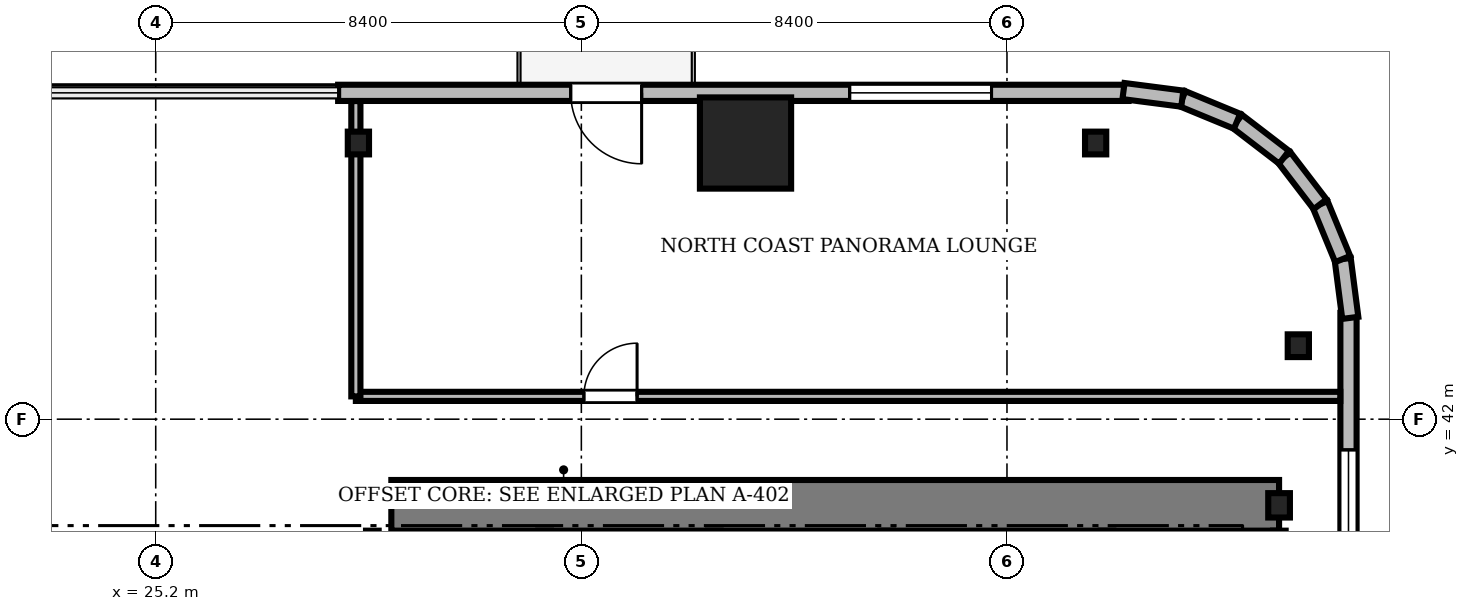
"""IFC4 building model, lengths in metres.
Left out: names, types, materials, properties, quantities, classifications, styles, units other than length and angle.
Written with IfcOpenShell. Run it as: python <this file> out.ifc"""

import sys

from ifc_helpers import new_model, si_unit, direction, frame, frame_2d, origin, origin_2d, place, context, subcontext, project, spatial, rectangle, i_section, extrude, source, transform, mapped, element, fill, save


model = new_model("IFC4")
c1 = context("Model", 3, precision=1e-05, world=origin(), true_north=direction((0.0, 1.0)))
c2 = subcontext(c1, "Body", "Model", "MODEL_VIEW")
j1 = project(units=[si_unit("LENGTHUNIT", "METRE"), si_unit("PLANEANGLEUNIT", "RADIAN")], contexts=[c1])
p1 = place(None, origin())
s1 = spatial("IfcSite", under=j1, at=p1, CompositionType="ELEMENT")
p2 = place(p1, origin())
s2 = spatial("IfcBuilding", under=s1, at=p2, CompositionType="ELEMENT")
p3 = place(p2, frame((0.0, 0.0, 49.5)))
s3 = spatial("IfcBuildingStorey", under=s2, at=p3, CompositionType="ELEMENT", Elevation=49.5)
m1 = source(origin(), c2, "Body", "SweptSolid", [
    extrude(rectangle(XDim=17.52, YDim=1.0, at=frame_2d((8.76, 0.0))), origin(), (0.0, 0.0, 1.0), 3.41),
])
p4 = place(p3, frame((29.85, 40.3, 0.0), z_axis=(0.0, 0.0, 1.0), x_axis=(1.0, 0.0, 0.0)))
e1 = element("IfcWall", 1, at=p4, inside=s3, PredefinedType="SHEAR", context=c2, shape_type="MappedRepresentation", body=[
    mapped(m1, transform((0.0, 0.0, 0.0), scale=1.0)),
])
m2 = source(origin(), c2, "Body", "SweptSolid", [
    extrude(i_section(OverallWidth=0.428, OverallDepth=0.481, WebThickness=0.04, FlangeThickness=0.063, FilletRadius=0.015, at=origin_2d()), origin(), (0.0, 0.0, 1.0), 3.41),
])
p5 = place(p3, frame((47.37, 40.3, 0.0), z_axis=(0.0, 0.0, 1.0), x_axis=(1.0, 0.0, 0.0)))
e2 = element("IfcColumn", 2, at=p5, inside=s3, PredefinedType="COLUMN", context=c2, shape_type="MappedRepresentation", body=[
    mapped(m2, transform((0.0, 0.0, 0.0), scale=1.0)),
])
m3 = source(origin(), c2, "Body", "SweptSolid", [
    extrude(rectangle(XDim=1.8, YDim=1.8, at=origin_2d()), origin(), (0.0, 0.0, 1.0), 3.41),
])
p6 = place(p3, frame((36.84, 47.45, 0.0), z_axis=(0.0, 0.0, 1.0), x_axis=(1.0, 0.0, 0.0)))
e3 = element("IfcColumn", 3, at=p6, inside=s3, PredefinedType="COLUMN", context=c2, shape_type="MappedRepresentation", body=[
    mapped(m3, transform((0.0, 0.0, 0.0), scale=1.0)),
])
m4 = source(origin(), c2, "Body", "SweptSolid", [
    extrude(i_section(OverallWidth=0.419, OverallDepth=0.449, WebThickness=0.031, FlangeThickness=0.048, FilletRadius=0.015, at=origin_2d()), origin(), (0.0, 0.0, 1.0), 3.41),
])
for number, where, z_axis, x_axis in (
    (4, (47.75, 43.45, 0.0), (0.0, 0.0, 1.0), (1.0, 0.0, 0.0)),
    (5, (43.75, 47.45, 0.0), (0.0, 0.0, 1.0), (1.0, 0.0, 0.0)),
    (6, (29.2, 47.45, 0.0), (0.0, 0.0, 1.0), (1.0, 0.0, 0.0)),
):
    element("IfcColumn", number, at=place(p3, frame(where, z_axis=z_axis, x_axis=x_axis)), inside=s3, PredefinedType="COLUMN", context=c2, shape_type="MappedRepresentation", body=[
        mapped(m4, transform((0.0, 0.0, 0.0), scale=1.0)),
    ])
m5 = source(origin(), c2, "Body", "SweptSolid", [
    extrude(rectangle(XDim=15.6, YDim=0.32, at=frame_2d((7.8, 0.0))), origin(), (0.0, 0.0, 1.0), 3.41),
])
p7 = place(p3, frame((44.4, 48.44, 0.0), z_axis=(0.0, 0.0, 1.0), x_axis=(-1.0, 0.0, 0.0)))
e7 = element("IfcWall", 7, at=p7, inside=s3, PredefinedType="SOLIDWALL", context=c2, shape_type="MappedRepresentation", body=[
    mapped(m5, transform((0.0, 0.0, 0.0), scale=1.0)),
])
m6 = source(origin(), c2, "Body", "SweptSolid", [
    extrude(rectangle(XDim=1.4, YDim=2.3, at=frame_2d((0.7, 1.15))), frame((0.0, 0.17, 0.0), z_axis=(0.0, -1.0, 0.0), x_axis=(1.0, 0.0, 0.0)), (0.0, 0.0, 1.0), 0.34),
])
p8 = place(p7, frame((9.61, 0.0, 0.0)))
e8 = element("IfcOpeningElement", 8, at=p8, cuts=e7, PredefinedType="OPENING", context=c2, shape_type="MappedRepresentation", body=[
    mapped(m6, transform((0.0, 0.0, 0.0), scale=1.0)),
])
m7 = source(origin(), c2, "Body", "SweptSolid", [
    extrude(rectangle(XDim=2.8, YDim=2.4, at=frame_2d((1.4, 1.2))), frame((0.0, 0.17, 0.0), z_axis=(0.0, -1.0, 0.0), x_axis=(1.0, 0.0, 0.0)), (0.0, 0.0, 1.0), 0.34),
])
p9 = place(p7, frame((2.705, 0.0, 0.72)))
e9 = element("IfcOpeningElement", 9, at=p9, cuts=e7, PredefinedType="OPENING", context=c2, shape_type="MappedRepresentation", body=[
    mapped(m7, transform((0.0, 0.0, 0.0), scale=1.0)),
])
m8 = source(origin(), c2, "Body", "SweptSolid", [
    extrude(rectangle(XDim=15.6, YDim=0.32, at=frame_2d((7.8, 0.0))), origin(), (0.0, 0.0, 1.0), 3.41),
])
p10 = place(p3, frame((48.74, 28.5, 0.0), z_axis=(0.0, 0.0, 1.0), x_axis=(0.0, 1.0, 0.0)))
e10 = element("IfcWall", 10, at=p10, inside=s3, PredefinedType="SOLIDWALL", context=c2, shape_type="MappedRepresentation", body=[
    mapped(m8, transform((0.0, 0.0, 0.0), scale=1.0)),
])
p11 = place(p10, frame((10.095, 0.0, 0.72)))
e11 = element("IfcOpeningElement", 11, at=p11, cuts=e10, PredefinedType="OPENING", context=c2, shape_type="MappedRepresentation", body=[
    mapped(m7, transform((0.0, 0.0, 0.0), scale=1.0)),
])
m9 = source(origin(), c2, "Body", "SweptSolid", [
    extrude(rectangle(XDim=1.17, YDim=0.32, at=frame_2d((0.585, 0.0))), origin(), (0.0, 0.0, 1.0), 3.41),
])
p12 = place(p3, frame((48.776, 44.0, 0.0), z_axis=(0.0, 0.0, 1.0), x_axis=(-0.128295670475, 0.991735963317, 0.0)))
e12 = element("IfcWall", 12, at=p12, inside=s3, PredefinedType="SOLIDWALL", context=c2, shape_type="MappedRepresentation", body=[
    mapped(m9, transform((0.0, 0.0, 0.0), scale=1.0)),
])
m10 = source(origin(), c2, "Body", "SweptSolid", [
    extrude(rectangle(XDim=1.169, YDim=0.32, at=frame_2d((0.584, 0.0))), origin(), (0.0, 0.0, 1.0), 3.41),
])
p13 = place(p3, frame((48.625, 45.16, 0.0), z_axis=(0.0, 0.0, 1.0), x_axis=(-0.381054331552, 0.924552646638, 0.0)))
e13 = element("IfcWall", 13, at=p13, inside=s3, PredefinedType="SOLIDWALL", context=c2, shape_type="MappedRepresentation", body=[
    mapped(m10, transform((0.0, 0.0, 0.0), scale=1.0)),
])
m11 = source(origin(), c2, "Body", "SweptSolid", [
    extrude(rectangle(XDim=1.169, YDim=0.32, at=frame_2d((0.584, 0.0))), origin(), (0.0, 0.0, 1.0), 3.41),
])
p14 = place(p3, frame((48.18, 46.241, 0.0), z_axis=(0.0, 0.0, 1.0), x_axis=(-0.608387696831, 0.793639975269, 0.0)))
e14 = element("IfcWall", 14, at=p14, inside=s3, PredefinedType="SOLIDWALL", context=c2, shape_type="MappedRepresentation", body=[
    mapped(m11, transform((0.0, 0.0, 0.0), scale=1.0)),
])
m12 = source(origin(), c2, "Body", "SweptSolid", [
    extrude(rectangle(XDim=1.169, YDim=0.32, at=frame_2d((0.584, 0.0))), origin(), (0.0, 0.0, 1.0), 3.41),
])
p15 = place(p3, frame((47.469, 47.169, 0.0), z_axis=(0.0, 0.0, 1.0), x_axis=(-0.793663520347, 0.608356981114, 0.0)))
e15 = element("IfcWall", 15, at=p15, inside=s3, PredefinedType="SOLIDWALL", context=c2, shape_type="MappedRepresentation", body=[
    mapped(m12, transform((0.0, 0.0, 0.0), scale=1.0)),
])
p16 = place(p3, frame((46.541, 47.88, 0.0), z_axis=(0.0, 0.0, 1.0), x_axis=(-0.924552646638, 0.381054331552, 0.0)))
e16 = element("IfcWall", 16, at=p16, inside=s3, PredefinedType="SOLIDWALL", context=c2, shape_type="MappedRepresentation", body=[
    mapped(m10, transform((0.0, 0.0, 0.0), scale=1.0)),
])
p17 = place(p3, frame((45.46, 48.325, 0.0), z_axis=(0.0, 0.0, 1.0), x_axis=(-0.991735963317, 0.128295670475, 0.0)))
e17 = element("IfcWall", 17, at=p17, inside=s3, PredefinedType="SOLIDWALL", context=c2, shape_type="MappedRepresentation", body=[
    mapped(m9, transform((0.0, 0.0, 0.0), scale=1.0)),
])
m13 = source(origin(), c2, "Body", "SweptSolid", [
    extrude(rectangle(XDim=9.15, YDim=0.25, at=frame_2d((4.575, 0.0))), origin(), (0.0, 0.0, 1.0), 3.45),
])
for number, where, z_axis, x_axis in (
    (18, (29.475, 30.65, 0.0), (0.0, 0.0, 1.0), (0.0, 1.0, 0.0)),
    (19, (32.875, 30.65, 0.0), (0.0, 0.0, 1.0), (0.0, 1.0, 0.0)),
    (20, (36.225, 30.65, 0.0), (0.0, 0.0, 1.0), (0.0, 1.0, 0.0)),
    (21, (39.625, 30.65, 0.0), (0.0, 0.0, 1.0), (0.0, 1.0, 0.0)),
    (22, (43.975, 30.65, 0.0), (0.0, 0.0, 1.0), (0.0, 1.0, 0.0)),
    (23, (47.375, 30.65, 0.0), (0.0, 0.0, 1.0), (0.0, 1.0, 0.0)),
):
    element("IfcWall", number, at=place(p3, frame(where, z_axis=z_axis, x_axis=x_axis)), inside=s3, PredefinedType="SOLIDWALL", context=c2, shape_type="MappedRepresentation", body=[
        mapped(m13, transform((0.0, 0.0, 0.0), scale=1.0)),
    ])
m14 = source(origin(), c2, "Body", "SweptSolid", [
    extrude(rectangle(XDim=19.428, YDim=0.18, at=frame_2d((9.714, 0.0))), origin(), (0.0, 0.0, 1.0), 2.652),
])
p18 = place(p3, frame((29.15, 42.45, 0.0), z_axis=(0.0, 0.0, 1.0), x_axis=(1.0, 0.0, 0.0)))
e24 = element("IfcWall", 24, at=p18, inside=s3, PredefinedType="PARTITIONING", context=c2, shape_type="MappedRepresentation", body=[
    mapped(m14, transform((0.0, 0.0, 0.0), scale=1.0)),
])
m15 = source(origin(), c2, "Body", "SweptSolid", [
    extrude(rectangle(XDim=1.05, YDim=2.2, at=frame_2d((0.525, 1.1))), frame((0.0, 0.1, 0.0), z_axis=(0.0, -1.0, 0.0), x_axis=(1.0, 0.0, 0.0)), (0.0, 0.0, 1.0), 0.2),
])
p19 = place(p18, frame((4.5, 0.0, 0.0)))
e25 = element("IfcOpeningElement", 25, at=p19, cuts=e24, PredefinedType="OPENING", context=c2, shape_type="MappedRepresentation", body=[
    mapped(m15, transform((0.0, 0.0, 0.0), scale=1.0)),
])
m16 = source(origin(), c2, "Body", "SweptSolid", [
    extrude(rectangle(XDim=5.828, YDim=0.18, at=frame_2d((2.914, 0.0))), origin(), (0.0, 0.0, 1.0), 2.652),
])
p20 = place(p3, frame((29.15, 42.45, 0.0), z_axis=(0.0, 0.0, 1.0), x_axis=(0.0, 1.0, 0.0)))
e26 = element("IfcWall", 26, at=p20, inside=s3, PredefinedType="PARTITIONING", context=c2, shape_type="MappedRepresentation", body=[
    mapped(m16, transform((0.0, 0.0, 0.0), scale=1.0)),
])
m17 = source(origin(), c2, "Body", "SweptSolid", [
    extrude(rectangle(XDim=1.4, YDim=2.3, at=frame_2d((0.7, 1.15))), frame((0.0, 0.025, 0.0), z_axis=(0.0, -1.0, 0.0), x_axis=(1.0, 0.0, 0.0)), (0.0, 0.0, 1.0), 0.05),
])
p21 = place(p8, frame((1.4, 0.0, 0.0), z_axis=(0.0, 0.0, 1.0), x_axis=(-1.0, 0.0, 0.0)))
e27 = element("IfcDoor", 27, at=p21, inside=s3, OperationType="DOUBLE_DOOR_SLIDING", PredefinedType="DOOR", context=c2, shape_type="MappedRepresentation", body=[
    mapped(m17, transform((0.0, 0.0, 0.0), scale=1.0)),
])
fill(e8, e27)
m18 = source(origin(), c2, "Body", "SweptSolid", [
    extrude(rectangle(XDim=2.8, YDim=2.4, at=frame_2d((1.4, 1.2))), frame((0.0, 0.03, 0.0), z_axis=(0.0, -1.0, 0.0), x_axis=(1.0, 0.0, 0.0)), (0.0, 0.0, 1.0), 0.06),
])
p22 = place(p9, origin())
e28 = element("IfcWindow", 28, at=p22, inside=s3, PartitioningType="SINGLE_PANEL", PredefinedType="WINDOW", context=c2, shape_type="MappedRepresentation", body=[
    mapped(m18, transform((0.0, 0.0, 0.0), scale=1.0)),
])
fill(e9, e28)
p23 = place(p11, origin())
e29 = element("IfcWindow", 29, at=p23, inside=s3, PartitioningType="SINGLE_PANEL", PredefinedType="WINDOW", context=c2, shape_type="MappedRepresentation", body=[
    mapped(m18, transform((0.0, 0.0, 0.0), scale=1.0)),
])
fill(e11, e29)
m19 = source(origin(), c2, "Body", "SweptSolid", [
    extrude(rectangle(XDim=1.05, YDim=2.2, at=frame_2d((0.525, 1.1))), frame((0.0, 0.025, 0.0), z_axis=(0.0, -1.0, 0.0), x_axis=(1.0, 0.0, 0.0)), (0.0, 0.0, 1.0), 0.05),
])
p24 = place(p19, origin())
e30 = element("IfcDoor", 30, at=p24, inside=s3, OperationType="SINGLE_SWING_RIGHT", PredefinedType="DOOR", context=c2, shape_type="MappedRepresentation", body=[
    mapped(m19, transform((0.0, 0.0, 0.0), scale=1.0)),
])
fill(e25, e30)
save(model, sys.argv[1])
